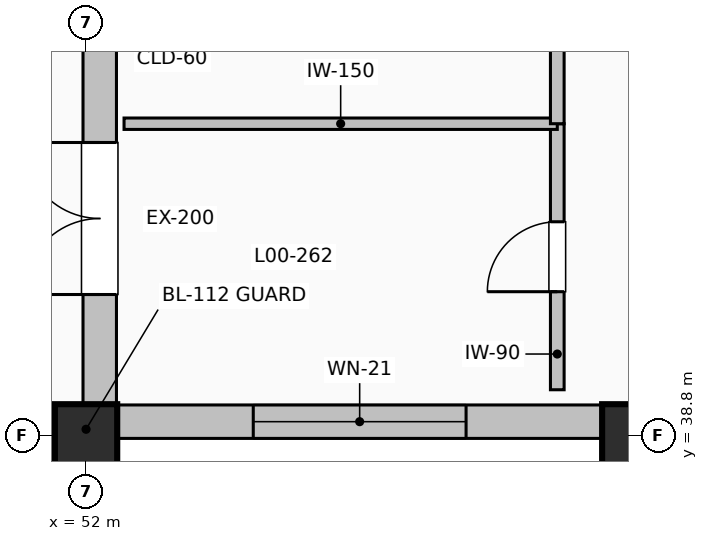
"""IFC4 building model, lengths in metres.
Left out: names, types, materials, properties, quantities, classifications, styles, units other than length and angle.
Written with IfcOpenShell. Run it as: python <this file> out.ifc"""

import sys

from ifc_helpers import new_model, si_unit, direction, frame, frame_2d, origin, origin_2d, place, context, subcontext, project, spatial, rectangle, extrude, element, fill, save


model = new_model("IFC4")
c1 = context("Model", 3, precision=1e-05, world=origin(), true_north=direction((0.0, 1.0)))
c2 = subcontext(c1, "Body", "Model", "MODEL_VIEW")
j1 = project(units=[si_unit("LENGTHUNIT", "METRE"), si_unit("PLANEANGLEUNIT", "RADIAN")], contexts=[c1])
p1 = place(None, origin())
s1 = spatial("IfcSite", under=j1, at=p1, CompositionType="ELEMENT")
p2 = place(p1, origin())
s2 = spatial("IfcBuilding", under=s1, at=p2, CompositionType="ELEMENT")
p3 = place(p2, origin())
s3 = spatial("IfcBuildingStorey", under=s2, at=p3, CompositionType="ELEMENT", Elevation=0.0)
for number, where, z_axis, x_axis in (
    (1, (52.0, 38.8, 0.0), (0.0, 0.0, 1.0), (1.0, 0.0, 0.0)),
    (2, (59.2, 38.8, 0.0), (0.0, 0.0, 1.0), (1.0, 0.0, 0.0)),
):
    element("IfcColumn", number, at=place(p3, frame(where, z_axis=z_axis, x_axis=x_axis)), inside=s3, PredefinedType="COLUMN", context=c2, shape_type="SweptSolid", body=[
        extrude(rectangle(XDim=0.82, YDim=0.82, at=origin_2d()), origin(), (0.0, 0.0, 1.0), 5.4),
    ])
p4 = place(p3, frame((52.18, 39.21, 0.0), z_axis=(0.0, 0.0, 1.0), x_axis=(0.0, 1.0, 0.0)))
e3 = element("IfcWall", 3, at=p4, inside=s3, PredefinedType="SOLIDWALL", context=c2, shape_type="SweptSolid", body=[
    extrude(rectangle(XDim=6.98, YDim=0.44, at=frame_2d((3.49, 0.0))), origin(), (0.0, 0.0, 1.0), 4.342),
])
p5 = place(p4, frame((1.443, 0.0, 0.0)))
e4 = element("IfcOpeningElement", 4, at=p5, cuts=e3, PredefinedType="OPENING", context=c2, shape_type="SweptSolid", body=[
    extrude(rectangle(XDim=2.0, YDim=2.4, at=frame_2d((1.0, 1.2))), frame((0.0, 0.23, 0.0), z_axis=(0.0, -1.0, 0.0), x_axis=(1.0, 0.0, 0.0)), (0.0, 0.0, 1.0), 0.46),
])
p6 = place(p3, frame((58.79, 38.98, 0.0), z_axis=(0.0, 0.0, 1.0), x_axis=(-1.0, 0.0, 0.0)))
e5 = element("IfcWall", 5, at=p6, inside=s3, PredefinedType="SOLIDWALL", context=c2, shape_type="SweptSolid", body=[
    extrude(rectangle(XDim=6.38, YDim=0.44, at=frame_2d((3.19, 0.0))), origin(), (0.0, 0.0, 1.0), 4.342),
])
p7 = place(p6, frame((1.79, 0.0, 1.05)))
e6 = element("IfcOpeningElement", 6, at=p7, cuts=e5, PredefinedType="OPENING", context=c2, shape_type="SweptSolid", body=[
    extrude(rectangle(XDim=2.8, YDim=1.35, at=frame_2d((1.4, 0.675))), frame((0.0, 0.23, 0.0), z_axis=(0.0, -1.0, 0.0), x_axis=(1.0, 0.0, 0.0)), (0.0, 0.0, 1.0), 0.46),
])
p8 = place(p3, frame((58.2, 39.4, 0.0), z_axis=(0.0, 0.0, 1.0), x_axis=(0.0, 1.0, 0.0)))
e7 = element("IfcWall", 7, at=p8, inside=s3, PredefinedType="PARTITIONING", context=c2, shape_type="SweptSolid", body=[
    extrude(rectangle(XDim=3.5, YDim=0.18, at=frame_2d((1.75, 0.0))), origin(), (0.0, 0.0, 1.0), 5.092),
])
p9 = place(p8, frame((1.29, 0.0, 0.0)))
e8 = element("IfcOpeningElement", 8, at=p9, cuts=e7, PredefinedType="OPENING", context=c2, shape_type="SweptSolid", body=[
    extrude(rectangle(XDim=0.92, YDim=2.05, at=frame_2d((0.46, 1.025))), frame((0.0, 0.1, 0.0), z_axis=(0.0, -1.0, 0.0), x_axis=(1.0, 0.0, 0.0)), (0.0, 0.0, 1.0), 0.2),
])
p10 = place(p3, frame((52.5, 42.9, 0.0), z_axis=(0.0, 0.0, 1.0), x_axis=(1.0, 0.0, 0.0)))
e9 = element("IfcWall", 9, at=p10, inside=s3, PredefinedType="PARTITIONING", context=c2, shape_type="SweptSolid", body=[
    extrude(rectangle(XDim=5.7, YDim=0.15, at=frame_2d((2.85, 0.0))), origin(), (0.0, 0.0, 1.0), 5.092),
])
p11 = place(p3, frame((58.2, 42.9, 0.0), z_axis=(0.0, 0.0, 1.0), x_axis=(0.0, 1.0, 0.0)))
e10 = element("IfcWall", 10, at=p11, inside=s3, PredefinedType="PARTITIONING", context=c2, shape_type="SweptSolid", body=[
    extrude(rectangle(XDim=3.5, YDim=0.18, at=frame_2d((1.75, 0.0))), origin(), (0.0, 0.0, 1.0), 5.092),
])
p12 = place(p11, frame((1.29, 0.0, 0.0)))
e11 = element("IfcOpeningElement", 11, at=p12, cuts=e10, PredefinedType="OPENING", context=c2, shape_type="SweptSolid", body=[
    extrude(rectangle(XDim=0.92, YDim=2.05, at=frame_2d((0.46, 1.025))), frame((0.0, 0.1, 0.0), z_axis=(0.0, -1.0, 0.0), x_axis=(1.0, 0.0, 0.0)), (0.0, 0.0, 1.0), 0.2),
])
p13 = place(p5, origin())
e12 = element("IfcDoor", 12, at=p13, inside=s3, OperationType="DOUBLE_DOOR_SINGLE_SWING", PredefinedType="DOOR", context=c2, shape_type="SweptSolid", body=[
    extrude(rectangle(XDim=2.0, YDim=2.4, at=frame_2d((1.0, 1.2))), frame((0.0, 0.025, 0.0), z_axis=(0.0, -1.0, 0.0), x_axis=(1.0, 0.0, 0.0)), (0.0, 0.0, 1.0), 0.05),
])
fill(e4, e12)
p14 = place(p7, origin())
e13 = element("IfcWindow", 13, at=p14, inside=s3, PartitioningType="SINGLE_PANEL", PredefinedType="WINDOW", context=c2, shape_type="SweptSolid", body=[
    extrude(rectangle(XDim=2.8, YDim=1.35, at=frame_2d((1.4, 0.675))), frame((0.0, 0.03, 0.0), z_axis=(0.0, -1.0, 0.0), x_axis=(1.0, 0.0, 0.0)), (0.0, 0.0, 1.0), 0.06),
])
fill(e6, e13)
p15 = place(p9, origin())
e14 = element("IfcDoor", 14, at=p15, inside=s3, OperationType="SINGLE_SWING_LEFT", PredefinedType="DOOR", context=c2, shape_type="SweptSolid", body=[
    extrude(rectangle(XDim=0.92, YDim=2.05, at=frame_2d((0.46, 1.025))), frame((0.0, 0.025, 0.0), z_axis=(0.0, -1.0, 0.0), x_axis=(1.0, 0.0, 0.0)), (0.0, 0.0, 1.0), 0.05),
])
fill(e8, e14)
save(model, sys.argv[1])
